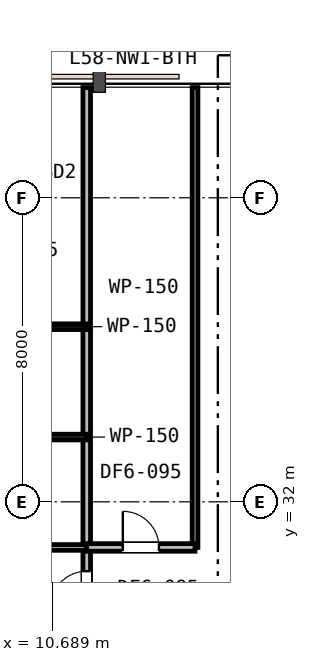
"""IFC4 building model, lengths in metres.
Left out: names, types, materials, properties, quantities, classifications, styles, units other than length and angle.
Written with IfcOpenShell. Run it as: python <this file> out.ifc"""

import sys

from ifc_helpers import new_model, si_unit, direction, frame, frame_2d, origin, place, context, subcontext, project, spatial, rectangle, extrude, element, fill, save


model = new_model("IFC4")
c1 = context("Model", 3, precision=1e-05, world=origin(), true_north=direction((0.0, 1.0)))
c2 = subcontext(c1, "Body", "Model", "MODEL_VIEW")
j1 = project(units=[si_unit("LENGTHUNIT", "METRE"), si_unit("PLANEANGLEUNIT", "RADIAN")], contexts=[c1])
p1 = place(None, origin())
s1 = spatial("IfcSite", under=j1, at=p1, CompositionType="ELEMENT")
p2 = place(p1, origin())
s2 = spatial("IfcBuilding", under=s1, at=p2, CompositionType="ELEMENT")
p3 = place(p2, frame((0.0, 0.0, 226.0)))
s3 = spatial("IfcBuildingStorey", under=s2, at=p3, CompositionType="ELEMENT", Elevation=226.0)
p4 = place(p3, frame((11.6, 17.0, 0.0), z_axis=(0.0, 0.0, 1.0), x_axis=(0.0, 1.0, 0.0)))
e1 = element("IfcWall", 1, at=p4, inside=s3, PredefinedType="PARTITIONING", context=c2, shape_type="SweptSolid", body=[
    extrude(rectangle(XDim=25.9, YDim=0.2, at=frame_2d((12.95, 0.0))), origin(), (0.0, 0.0, 1.0), 2.92),
])
p5 = place(p4, frame((12.225, 0.0, 0.0)))
e2 = element("IfcOpeningElement", 2, at=p5, cuts=e1, PredefinedType="OPENING", context=c2, shape_type="SweptSolid", body=[
    extrude(rectangle(XDim=0.95, YDim=2.15, at=frame_2d((0.475, 1.075))), frame((0.0, 0.11, 0.0), z_axis=(0.0, -1.0, 0.0), x_axis=(1.0, 0.0, 0.0)), (0.0, 0.0, 1.0), 0.22),
])
p6 = place(p4, frame((0.723, 0.0, 0.0)))
e3 = element("IfcOpeningElement", 3, at=p6, cuts=e1, PredefinedType="OPENING", context=c2, shape_type="SweptSolid", body=[
    extrude(rectangle(XDim=0.95, YDim=2.15, at=frame_2d((0.475, 1.075))), frame((0.0, 0.11, 0.0), z_axis=(0.0, -1.0, 0.0), x_axis=(1.0, 0.0, 0.0)), (0.0, 0.0, 1.0), 0.22),
])
p7 = place(p3, frame((9.13, 30.8, 0.0), z_axis=(0.0, 0.0, 1.0), x_axis=(1.0, 0.0, 0.0)))
e4 = element("IfcWall", 4, at=p7, inside=s3, PredefinedType="PARTITIONING", context=c2, shape_type="SweptSolid", body=[
    extrude(rectangle(XDim=2.47, YDim=0.15, at=frame_2d((1.235, 0.0))), origin(), (0.0, 0.0, 1.0), 2.92),
])
p8 = place(p3, frame((9.13, 33.704, 0.0), z_axis=(0.0, 0.0, 1.0), x_axis=(1.0, 0.0, 0.0)))
e5 = element("IfcWall", 5, at=p8, inside=s3, PredefinedType="PARTITIONING", context=c2, shape_type="SweptSolid", body=[
    extrude(rectangle(XDim=2.47, YDim=0.15, at=frame_2d((1.235, 0.0))), origin(), (0.0, 0.0, 1.0), 3.53),
])
p9 = place(p3, frame((5.1, 36.608, 0.0), z_axis=(0.0, 0.0, 1.0), x_axis=(1.0, 0.0, 0.0)))
e6 = element("IfcWall", 6, at=p9, inside=s3, PredefinedType="PARTITIONING", context=c2, shape_type="SweptSolid", body=[
    extrude(rectangle(XDim=6.5, YDim=0.15, at=frame_2d((3.25, 0.0))), origin(), (0.0, 0.0, 1.0), 3.24),
])
p10 = place(p9, frame((0.84, 0.0, 0.0)))
e7 = element("IfcOpeningElement", 7, at=p10, cuts=e6, PredefinedType="OPENING", context=c2, shape_type="SweptSolid", body=[
    extrude(rectangle(XDim=0.9, YDim=2.15, at=frame_2d((0.45, 1.075))), frame((0.0, 0.085, 0.0), z_axis=(0.0, -1.0, 0.0), x_axis=(1.0, 0.0, 0.0)), (0.0, 0.0, 1.0), 0.17),
])
p11 = place(p9, frame((2.855, 0.0, 0.0)))
e8 = element("IfcOpeningElement", 8, at=p11, cuts=e6, PredefinedType="OPENING", context=c2, shape_type="SweptSolid", body=[
    extrude(rectangle(XDim=0.9, YDim=2.15, at=frame_2d((0.45, 1.075))), frame((0.0, 0.085, 0.0), z_axis=(0.0, -1.0, 0.0), x_axis=(1.0, 0.0, 0.0)), (0.0, 0.0, 1.0), 0.17),
])
p12 = place(p3, frame((14.45, 30.8, 0.0), z_axis=(0.0, 0.0, 1.0), x_axis=(0.0, 1.0, 0.0)))
e9 = element("IfcWall", 9, at=p12, inside=s3, PredefinedType="PARTITIONING", context=c2, shape_type="SweptSolid", body=[
    extrude(rectangle(XDim=12.1, YDim=0.15, at=frame_2d((6.05, 0.0))), origin(), (0.0, 0.0, 1.0), 2.92),
])
p13 = place(p3, frame((11.6, 30.8, 0.0), z_axis=(0.0, 0.0, 1.0), x_axis=(1.0, 0.0, 0.0)))
e10 = element("IfcWall", 10, at=p13, inside=s3, PredefinedType="PARTITIONING", context=c2, shape_type="SweptSolid", body=[
    extrude(rectangle(XDim=2.85, YDim=0.2, at=frame_2d((1.425, 0.0))), origin(), (0.0, 0.0, 1.0), 2.92),
])
p14 = place(p13, frame((0.95, 0.0, 0.0)))
e11 = element("IfcOpeningElement", 11, at=p14, cuts=e10, PredefinedType="OPENING", context=c2, shape_type="SweptSolid", body=[
    extrude(rectangle(XDim=0.95, YDim=2.15, at=frame_2d((0.475, 1.075))), frame((0.0, 0.11, 0.0), z_axis=(0.0, -1.0, 0.0), x_axis=(1.0, 0.0, 0.0)), (0.0, 0.0, 1.0), 0.22),
])
p15 = place(p5, origin())
e12 = element("IfcDoor", 12, at=p15, inside=s3, OperationType="SINGLE_SWING_LEFT", PredefinedType="DOOR", context=c2, shape_type="SweptSolid", body=[
    extrude(rectangle(XDim=0.95, YDim=2.15, at=frame_2d((0.475, 1.075))), frame((0.0, 0.025, 0.0), z_axis=(0.0, -1.0, 0.0), x_axis=(1.0, 0.0, 0.0)), (0.0, 0.0, 1.0), 0.05),
])
fill(e2, e12)
p16 = place(p14, origin())
e13 = element("IfcDoor", 13, at=p16, inside=s3, OperationType="SINGLE_SWING_LEFT", PredefinedType="DOOR", context=c2, shape_type="SweptSolid", body=[
    extrude(rectangle(XDim=0.95, YDim=2.15, at=frame_2d((0.475, 1.075))), frame((0.0, 0.025, 0.0), z_axis=(0.0, -1.0, 0.0), x_axis=(1.0, 0.0, 0.0)), (0.0, 0.0, 1.0), 0.05),
])
fill(e11, e13)
save(model, sys.argv[1])
